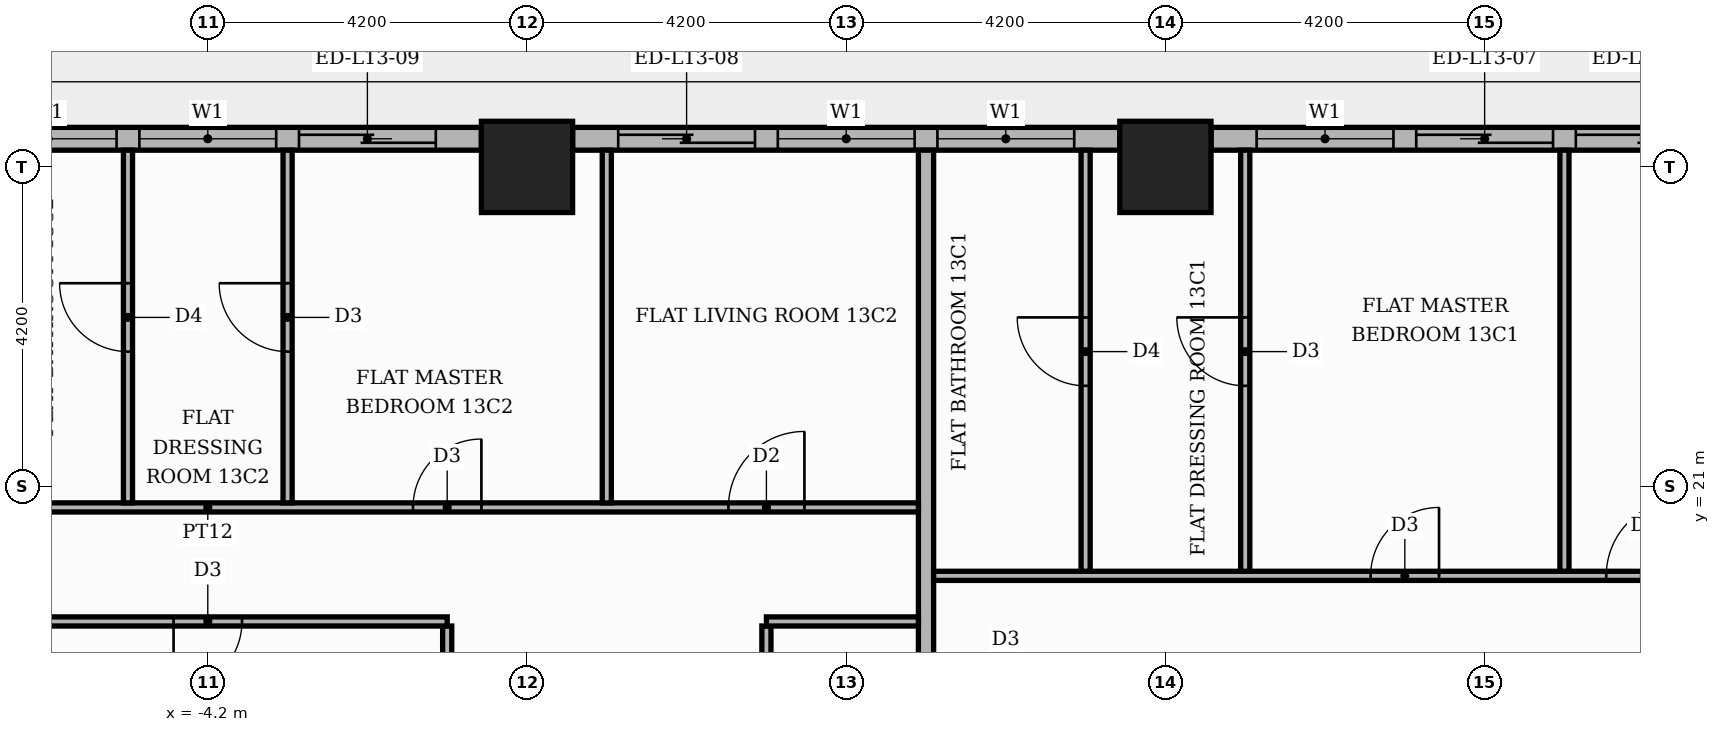
"""IFC4 building model, lengths in metres.
Left out: names, types, materials, properties, quantities, classifications, styles, units other than length and angle.
Written with IfcOpenShell. Run it as: python <this file> out.ifc"""

import sys

from ifc_helpers import new_model, si_unit, direction, frame, frame_2d, origin, origin_2d, place, context, subcontext, project, spatial, rectangle, extrude, element, fill, save


model = new_model("IFC4")
c1 = context("Model", 3, precision=1e-05, world=origin(), true_north=direction((0.0, 1.0)))
c2 = subcontext(c1, "Body", "Model", "MODEL_VIEW")
j1 = project(units=[si_unit("LENGTHUNIT", "METRE"), si_unit("PLANEANGLEUNIT", "RADIAN")], contexts=[c1])
p1 = place(None, origin())
s1 = spatial("IfcSite", under=j1, at=p1, CompositionType="ELEMENT")
p2 = place(p1, origin())
s2 = spatial("IfcBuilding", under=s1, at=p2, CompositionType="ELEMENT")
p3 = place(p2, frame((0.0, 0.0, 58.2)))
s3 = spatial("IfcBuildingStorey", under=s2, at=p3, CompositionType="ELEMENT", Elevation=58.2)
for number, where, z_axis, x_axis in (
    (1, (0.0, 25.2, 0.0), (0.0, 0.0, 1.0), (1.0, 0.0, 0.0)),
    (2, (8.4, 25.2, 0.0), (0.0, 0.0, 1.0), (1.0, 0.0, 0.0)),
):
    element("IfcColumn", number, at=place(p3, frame(where, z_axis=z_axis, x_axis=x_axis)), inside=s3, PredefinedType="COLUMN", context=c2, shape_type="SweptSolid", body=[
        extrude(rectangle(XDim=1.2, YDim=1.2, at=origin_2d()), origin(), (0.0, 0.0, 1.0), 3.9),
    ])
p4 = place(p3, frame((16.2, 25.57, 0.0), z_axis=(0.0, 0.0, 1.0), x_axis=(-1.0, 0.0, 0.0)))
e3 = element("IfcWall", 3, at=p4, inside=s3, PredefinedType="STANDARD", context=c2, shape_type="SweptSolid", body=[
    extrude(rectangle(XDim=7.2, YDim=0.3, at=frame_2d((3.6, 0.0))), origin(), (0.0, 0.0, 1.0), 3.48),
])
p5 = place(p4, frame((0.6, 0.0, 0.0)))
e4 = element("IfcOpeningElement", 4, at=p5, cuts=e3, PredefinedType="OPENING", context=c2, shape_type="SweptSolid", body=[
    extrude(rectangle(XDim=1.8, YDim=2.4, at=frame_2d((0.9, 1.2))), frame((0.0, 0.16, 0.0), z_axis=(0.0, -1.0, 0.0), x_axis=(1.0, 0.0, 0.0)), (0.0, 0.0, 1.0), 0.32),
])
p6 = place(p4, frame((2.7, 0.0, 0.0)))
e5 = element("IfcOpeningElement", 5, at=p6, cuts=e3, PredefinedType="OPENING", context=c2, shape_type="SweptSolid", body=[
    extrude(rectangle(XDim=1.8, YDim=2.4, at=frame_2d((0.9, 1.2))), frame((0.0, 0.16, 0.0), z_axis=(0.0, -1.0, 0.0), x_axis=(1.0, 0.0, 0.0)), (0.0, 0.0, 1.0), 0.32),
])
p7 = place(p4, frame((4.8, 0.0, 0.9)))
e6 = element("IfcOpeningElement", 6, at=p7, cuts=e3, PredefinedType="OPENING", context=c2, shape_type="SweptSolid", body=[
    extrude(rectangle(XDim=1.8, YDim=2.1, at=frame_2d((0.9, 1.05))), frame((0.0, 0.16, 0.0), z_axis=(0.0, -1.0, 0.0), x_axis=(1.0, 0.0, 0.0)), (0.0, 0.0, 1.0), 0.32),
])
p8 = place(p3, frame((7.8, 25.57, 0.0), z_axis=(0.0, 0.0, 1.0), x_axis=(-1.0, 0.0, 0.0)))
e7 = element("IfcWall", 7, at=p8, inside=s3, PredefinedType="STANDARD", context=c2, shape_type="SweptSolid", body=[
    extrude(rectangle(XDim=7.2, YDim=0.3, at=frame_2d((3.6, 0.0))), origin(), (0.0, 0.0, 1.0), 3.48),
])
p9 = place(p8, frame((0.6, 0.0, 0.9)))
e8 = element("IfcOpeningElement", 8, at=p9, cuts=e7, PredefinedType="OPENING", context=c2, shape_type="SweptSolid", body=[
    extrude(rectangle(XDim=1.8, YDim=2.1, at=frame_2d((0.9, 1.05))), frame((0.0, 0.16, 0.0), z_axis=(0.0, -1.0, 0.0), x_axis=(1.0, 0.0, 0.0)), (0.0, 0.0, 1.0), 0.32),
])
p10 = place(p8, frame((2.7, 0.0, 0.9)))
e9 = element("IfcOpeningElement", 9, at=p10, cuts=e7, PredefinedType="OPENING", context=c2, shape_type="SweptSolid", body=[
    extrude(rectangle(XDim=1.8, YDim=2.1, at=frame_2d((0.9, 1.05))), frame((0.0, 0.16, 0.0), z_axis=(0.0, -1.0, 0.0), x_axis=(1.0, 0.0, 0.0)), (0.0, 0.0, 1.0), 0.32),
])
p11 = place(p8, frame((4.8, 0.0, 0.0)))
e10 = element("IfcOpeningElement", 10, at=p11, cuts=e7, PredefinedType="OPENING", context=c2, shape_type="SweptSolid", body=[
    extrude(rectangle(XDim=1.8, YDim=2.4, at=frame_2d((0.9, 1.2))), frame((0.0, 0.16, 0.0), z_axis=(0.0, -1.0, 0.0), x_axis=(1.0, 0.0, 0.0)), (0.0, 0.0, 1.0), 0.32),
])
p12 = place(p3, frame((-0.6, 25.57, 0.0), z_axis=(0.0, 0.0, 1.0), x_axis=(-1.0, 0.0, 0.0)))
e11 = element("IfcWall", 11, at=p12, inside=s3, PredefinedType="STANDARD", context=c2, shape_type="SweptSolid", body=[
    extrude(rectangle(XDim=7.2, YDim=0.3, at=frame_2d((3.6, 0.0))), origin(), (0.0, 0.0, 1.0), 3.48),
])
p13 = place(p12, frame((0.6, 0.0, 0.0)))
e12 = element("IfcOpeningElement", 12, at=p13, cuts=e11, PredefinedType="OPENING", context=c2, shape_type="SweptSolid", body=[
    extrude(rectangle(XDim=1.8, YDim=2.4, at=frame_2d((0.9, 1.2))), frame((0.0, 0.16, 0.0), z_axis=(0.0, -1.0, 0.0), x_axis=(1.0, 0.0, 0.0)), (0.0, 0.0, 1.0), 0.32),
])
p14 = place(p12, frame((2.7, 0.0, 0.9)))
e13 = element("IfcOpeningElement", 13, at=p14, cuts=e11, PredefinedType="OPENING", context=c2, shape_type="SweptSolid", body=[
    extrude(rectangle(XDim=1.8, YDim=2.1, at=frame_2d((0.9, 1.05))), frame((0.0, 0.16, 0.0), z_axis=(0.0, -1.0, 0.0), x_axis=(1.0, 0.0, 0.0)), (0.0, 0.0, 1.0), 0.32),
])
p15 = place(p12, frame((4.8, 0.0, 0.9)))
e14 = element("IfcOpeningElement", 14, at=p15, cuts=e11, PredefinedType="OPENING", context=c2, shape_type="SweptSolid", body=[
    extrude(rectangle(XDim=1.8, YDim=2.1, at=frame_2d((0.9, 1.05))), frame((0.0, 0.16, 0.0), z_axis=(0.0, -1.0, 0.0), x_axis=(1.0, 0.0, 0.0)), (0.0, 0.0, 1.0), 0.32),
])
p16 = place(p3, frame((-1.05, 13.75, 0.0), z_axis=(0.0, 0.0, 1.0), x_axis=(0.0, 1.0, 0.0)))
e15 = element("IfcWall", 15, at=p16, inside=s3, PredefinedType="PARTITIONING", context=c2, shape_type="SweptSolid", body=[
    extrude(rectangle(XDim=5.41, YDim=0.12, at=frame_2d((2.705, 0.0))), origin(), (0.0, 0.0, 1.0), 3.48),
])
p17 = place(p3, frame((3.15, 13.75, 0.0), z_axis=(0.0, 0.0, 1.0), x_axis=(0.0, 1.0, 0.0)))
e16 = element("IfcWall", 16, at=p17, inside=s3, PredefinedType="PARTITIONING", context=c2, shape_type="SweptSolid", body=[
    extrude(rectangle(XDim=5.41, YDim=0.12, at=frame_2d((2.705, 0.0))), origin(), (0.0, 0.0, 1.0), 3.48),
])
p18 = place(p17, frame((2.235, 0.0, 0.0)))
e17 = element("IfcOpeningElement", 17, at=p18, cuts=e16, PredefinedType="OPENING", context=c2, shape_type="SweptSolid", body=[
    extrude(rectangle(XDim=0.9, YDim=2.1, at=frame_2d((0.45, 1.05))), frame((0.0, 0.07, 0.0), z_axis=(0.0, -1.0, 0.0), x_axis=(1.0, 0.0, 0.0)), (0.0, 0.0, 1.0), 0.14),
])
p19 = place(p3, frame((5.25, 13.75, 0.0), z_axis=(0.0, 0.0, 1.0), x_axis=(0.0, 1.0, 0.0)))
e18 = element("IfcWall", 18, at=p19, inside=s3, PredefinedType="PARTITIONING", context=c2, shape_type="SweptSolid", body=[
    extrude(rectangle(XDim=11.67, YDim=0.2, at=frame_2d((5.835, 0.0))), origin(), (0.0, 0.0, 1.0), 3.48),
])
p20 = place(p3, frame((-13.55, 19.22, 0.0), z_axis=(0.0, 0.0, 1.0), x_axis=(1.0, 0.0, 0.0)))
e19 = element("IfcWall", 19, at=p20, inside=s3, PredefinedType="PARTITIONING", context=c2, shape_type="SweptSolid", body=[
    extrude(rectangle(XDim=12.5, YDim=0.12, at=frame_2d((6.25, 0.0))), origin(), (0.0, 0.0, 1.0), 3.48),
])
p21 = place(p20, frame((8.9, 0.0, 0.0)))
e20 = element("IfcOpeningElement", 20, at=p21, cuts=e19, PredefinedType="OPENING", context=c2, shape_type="SweptSolid", body=[
    extrude(rectangle(XDim=0.9, YDim=2.1, at=frame_2d((0.45, 1.05))), frame((0.0, 0.07, 0.0), z_axis=(0.0, -1.0, 0.0), x_axis=(1.0, 0.0, 0.0)), (0.0, 0.0, 1.0), 0.14),
])
p22 = place(p20, frame((4.55, 0.0, 0.0)))
e21 = element("IfcOpeningElement", 21, at=p22, cuts=e19, PredefinedType="OPENING", context=c2, shape_type="SweptSolid", body=[
    extrude(rectangle(XDim=0.9, YDim=2.1, at=frame_2d((0.45, 1.05))), frame((0.0, 0.07, 0.0), z_axis=(0.0, -1.0, 0.0), x_axis=(1.0, 0.0, 0.0)), (0.0, 0.0, 1.0), 0.14),
])
p23 = place(p20, frame((1.4, 0.0, 0.0)))
e22 = element("IfcOpeningElement", 22, at=p23, cuts=e19, PredefinedType="OPENING", context=c2, shape_type="SweptSolid", body=[
    extrude(rectangle(XDim=0.9, YDim=2.1, at=frame_2d((0.45, 1.05))), frame((0.0, 0.07, 0.0), z_axis=(0.0, -1.0, 0.0), x_axis=(1.0, 0.0, 0.0)), (0.0, 0.0, 1.0), 0.14),
])
p24 = place(p3, frame((3.15, 19.22, 0.0), z_axis=(0.0, 0.0, 1.0), x_axis=(1.0, 0.0, 0.0)))
e23 = element("IfcWall", 23, at=p24, inside=s3, PredefinedType="PARTITIONING", context=c2, shape_type="SweptSolid", body=[
    extrude(rectangle(XDim=2.0, YDim=0.12, at=frame_2d((1.0, 0.0))), origin(), (0.0, 0.0, 1.0), 3.48),
])
p25 = place(p3, frame((5.35, 19.82, 0.0), z_axis=(0.0, 0.0, 1.0), x_axis=(1.0, 0.0, 0.0)))
e24 = element("IfcWall", 24, at=p25, inside=s3, PredefinedType="PARTITIONING", context=c2, shape_type="SweptSolid", body=[
    extrude(rectangle(XDim=11.95, YDim=0.12, at=frame_2d((5.975, 0.0))), origin(), (0.0, 0.0, 1.0), 3.48),
])
p26 = place(p25, frame((8.85, 0.0, 0.0)))
e25 = element("IfcOpeningElement", 25, at=p26, cuts=e24, PredefinedType="OPENING", context=c2, shape_type="SweptSolid", body=[
    extrude(rectangle(XDim=1.0, YDim=2.1, at=frame_2d((0.5, 1.05))), frame((0.0, 0.07, 0.0), z_axis=(0.0, -1.0, 0.0), x_axis=(1.0, 0.0, 0.0)), (0.0, 0.0, 1.0), 0.14),
])
p27 = place(p25, frame((5.75, 0.0, 0.0)))
e26 = element("IfcOpeningElement", 26, at=p27, cuts=e24, PredefinedType="OPENING", context=c2, shape_type="SweptSolid", body=[
    extrude(rectangle(XDim=0.9, YDim=2.1, at=frame_2d((0.45, 1.05))), frame((0.0, 0.07, 0.0), z_axis=(0.0, -1.0, 0.0), x_axis=(1.0, 0.0, 0.0)), (0.0, 0.0, 1.0), 0.14),
])
p28 = place(p3, frame((7.35, 19.88, 0.0), z_axis=(0.0, 0.0, 1.0), x_axis=(0.0, 1.0, 0.0)))
e27 = element("IfcWall", 27, at=p28, inside=s3, PredefinedType="PARTITIONING", context=c2, shape_type="SweptSolid", body=[
    extrude(rectangle(XDim=5.54, YDim=0.12, at=frame_2d((2.77, 0.0))), origin(), (0.0, 0.0, 1.0), 3.48),
])
p29 = place(p28, frame((2.44, 0.0, 0.0)))
e28 = element("IfcOpeningElement", 28, at=p29, cuts=e27, PredefinedType="OPENING", context=c2, shape_type="SweptSolid", body=[
    extrude(rectangle(XDim=0.9, YDim=2.1, at=frame_2d((0.45, 1.05))), frame((0.0, 0.07, 0.0), z_axis=(0.0, -1.0, 0.0), x_axis=(1.0, 0.0, 0.0)), (0.0, 0.0, 1.0), 0.14),
])
p30 = place(p3, frame((9.45, 19.88, 0.0), z_axis=(0.0, 0.0, 1.0), x_axis=(0.0, 1.0, 0.0)))
e29 = element("IfcWall", 29, at=p30, inside=s3, PredefinedType="PARTITIONING", context=c2, shape_type="SweptSolid", body=[
    extrude(rectangle(XDim=5.54, YDim=0.12, at=frame_2d((2.77, 0.0))), origin(), (0.0, 0.0, 1.0), 3.48),
])
p31 = place(p30, frame((2.44, 0.0, 0.0)))
e30 = element("IfcOpeningElement", 30, at=p31, cuts=e29, PredefinedType="OPENING", context=c2, shape_type="SweptSolid", body=[
    extrude(rectangle(XDim=0.9, YDim=2.1, at=frame_2d((0.45, 1.05))), frame((0.0, 0.07, 0.0), z_axis=(0.0, -1.0, 0.0), x_axis=(1.0, 0.0, 0.0)), (0.0, 0.0, 1.0), 0.14),
])
p32 = place(p3, frame((13.65, 19.88, 0.0), z_axis=(0.0, 0.0, 1.0), x_axis=(0.0, 1.0, 0.0)))
e31 = element("IfcWall", 31, at=p32, inside=s3, PredefinedType="PARTITIONING", context=c2, shape_type="SweptSolid", body=[
    extrude(rectangle(XDim=5.54, YDim=0.12, at=frame_2d((2.77, 0.0))), origin(), (0.0, 0.0, 1.0), 3.48),
])
p33 = place(p3, frame((-13.55, 20.72, 0.0), z_axis=(0.0, 0.0, 1.0), x_axis=(1.0, 0.0, 0.0)))
e32 = element("IfcWall", 32, at=p33, inside=s3, PredefinedType="PARTITIONING", context=c2, shape_type="SweptSolid", body=[
    extrude(rectangle(XDim=18.7, YDim=0.12, at=frame_2d((9.35, 0.0))), origin(), (0.0, 0.0, 1.0), 3.48),
])
p34 = place(p33, frame((16.2, 0.0, 0.0)))
e33 = element("IfcOpeningElement", 33, at=p34, cuts=e32, PredefinedType="OPENING", context=c2, shape_type="SweptSolid", body=[
    extrude(rectangle(XDim=1.0, YDim=2.1, at=frame_2d((0.5, 1.05))), frame((0.0, 0.07, 0.0), z_axis=(0.0, -1.0, 0.0), x_axis=(1.0, 0.0, 0.0)), (0.0, 0.0, 1.0), 0.14),
])
p35 = place(p33, frame((12.05, 0.0, 0.0)))
e34 = element("IfcOpeningElement", 34, at=p35, cuts=e32, PredefinedType="OPENING", context=c2, shape_type="SweptSolid", body=[
    extrude(rectangle(XDim=0.9, YDim=2.1, at=frame_2d((0.45, 1.05))), frame((0.0, 0.07, 0.0), z_axis=(0.0, -1.0, 0.0), x_axis=(1.0, 0.0, 0.0)), (0.0, 0.0, 1.0), 0.14),
])
p36 = place(p33, frame((3.65, 0.0, 0.0)))
e35 = element("IfcOpeningElement", 35, at=p36, cuts=e32, PredefinedType="OPENING", context=c2, shape_type="SweptSolid", body=[
    extrude(rectangle(XDim=0.9, YDim=2.1, at=frame_2d((0.45, 1.05))), frame((0.0, 0.07, 0.0), z_axis=(0.0, -1.0, 0.0), x_axis=(1.0, 0.0, 0.0)), (0.0, 0.0, 1.0), 0.14),
])
p37 = place(p3, frame((-5.25, 20.78, 0.0), z_axis=(0.0, 0.0, 1.0), x_axis=(0.0, 1.0, 0.0)))
e36 = element("IfcWall", 36, at=p37, inside=s3, PredefinedType="PARTITIONING", context=c2, shape_type="SweptSolid", body=[
    extrude(rectangle(XDim=4.64, YDim=0.12, at=frame_2d((2.32, 0.0))), origin(), (0.0, 0.0, 1.0), 3.48),
])
p38 = place(p37, frame((1.99, 0.0, 0.0)))
e37 = element("IfcOpeningElement", 37, at=p38, cuts=e36, PredefinedType="OPENING", context=c2, shape_type="SweptSolid", body=[
    extrude(rectangle(XDim=0.9, YDim=2.1, at=frame_2d((0.45, 1.05))), frame((0.0, 0.07, 0.0), z_axis=(0.0, -1.0, 0.0), x_axis=(1.0, 0.0, 0.0)), (0.0, 0.0, 1.0), 0.14),
])
p39 = place(p3, frame((-3.15, 20.78, 0.0), z_axis=(0.0, 0.0, 1.0), x_axis=(0.0, 1.0, 0.0)))
e38 = element("IfcWall", 38, at=p39, inside=s3, PredefinedType="PARTITIONING", context=c2, shape_type="SweptSolid", body=[
    extrude(rectangle(XDim=4.64, YDim=0.12, at=frame_2d((2.32, 0.0))), origin(), (0.0, 0.0, 1.0), 3.48),
])
p40 = place(p39, frame((1.99, 0.0, 0.0)))
e39 = element("IfcOpeningElement", 39, at=p40, cuts=e38, PredefinedType="OPENING", context=c2, shape_type="SweptSolid", body=[
    extrude(rectangle(XDim=0.9, YDim=2.1, at=frame_2d((0.45, 1.05))), frame((0.0, 0.07, 0.0), z_axis=(0.0, -1.0, 0.0), x_axis=(1.0, 0.0, 0.0)), (0.0, 0.0, 1.0), 0.14),
])
p41 = place(p3, frame((1.05, 20.78, 0.0), z_axis=(0.0, 0.0, 1.0), x_axis=(0.0, 1.0, 0.0)))
e40 = element("IfcWall", 40, at=p41, inside=s3, PredefinedType="PARTITIONING", context=c2, shape_type="SweptSolid", body=[
    extrude(rectangle(XDim=4.64, YDim=0.12, at=frame_2d((2.32, 0.0))), origin(), (0.0, 0.0, 1.0), 3.48),
])
p42 = place(p5, origin())
e41 = element("IfcDoor", 41, at=p42, inside=s3, OperationType="SLIDING_TO_LEFT", PredefinedType="DOOR", context=c2, shape_type="SweptSolid", body=[
    extrude(rectangle(XDim=1.8, YDim=2.4, at=frame_2d((0.9, 1.2))), frame((0.0, 0.025, 0.0), z_axis=(0.0, -1.0, 0.0), x_axis=(1.0, 0.0, 0.0)), (0.0, 0.0, 1.0), 0.05),
])
fill(e4, e41)
p43 = place(p6, origin())
e42 = element("IfcDoor", 42, at=p43, inside=s3, OperationType="SLIDING_TO_RIGHT", PredefinedType="DOOR", context=c2, shape_type="SweptSolid", body=[
    extrude(rectangle(XDim=1.8, YDim=2.4, at=frame_2d((0.9, 1.2))), frame((0.0, 0.025, 0.0), z_axis=(0.0, -1.0, 0.0), x_axis=(1.0, 0.0, 0.0)), (0.0, 0.0, 1.0), 0.05),
])
fill(e5, e42)
p44 = place(p7, origin())
e43 = element("IfcWindow", 43, at=p44, inside=s3, PartitioningType="SINGLE_PANEL", PredefinedType="WINDOW", context=c2, shape_type="SweptSolid", body=[
    extrude(rectangle(XDim=1.8, YDim=2.1, at=frame_2d((0.9, 1.05))), frame((0.0, 0.03, 0.0), z_axis=(0.0, -1.0, 0.0), x_axis=(1.0, 0.0, 0.0)), (0.0, 0.0, 1.0), 0.06),
])
fill(e6, e43)
p45 = place(p9, origin())
e44 = element("IfcWindow", 44, at=p45, inside=s3, PartitioningType="SINGLE_PANEL", PredefinedType="WINDOW", context=c2, shape_type="SweptSolid", body=[
    extrude(rectangle(XDim=1.8, YDim=2.1, at=frame_2d((0.9, 1.05))), frame((0.0, 0.03, 0.0), z_axis=(0.0, -1.0, 0.0), x_axis=(1.0, 0.0, 0.0)), (0.0, 0.0, 1.0), 0.06),
])
fill(e8, e44)
p46 = place(p10, origin())
e45 = element("IfcWindow", 45, at=p46, inside=s3, PartitioningType="SINGLE_PANEL", PredefinedType="WINDOW", context=c2, shape_type="SweptSolid", body=[
    extrude(rectangle(XDim=1.8, YDim=2.1, at=frame_2d((0.9, 1.05))), frame((0.0, 0.03, 0.0), z_axis=(0.0, -1.0, 0.0), x_axis=(1.0, 0.0, 0.0)), (0.0, 0.0, 1.0), 0.06),
])
fill(e9, e45)
p47 = place(p11, origin())
e46 = element("IfcDoor", 46, at=p47, inside=s3, OperationType="SLIDING_TO_RIGHT", PredefinedType="DOOR", context=c2, shape_type="SweptSolid", body=[
    extrude(rectangle(XDim=1.8, YDim=2.4, at=frame_2d((0.9, 1.2))), frame((0.0, 0.025, 0.0), z_axis=(0.0, -1.0, 0.0), x_axis=(1.0, 0.0, 0.0)), (0.0, 0.0, 1.0), 0.05),
])
fill(e10, e46)
p48 = place(p13, origin())
e47 = element("IfcDoor", 47, at=p48, inside=s3, OperationType="SLIDING_TO_LEFT", PredefinedType="DOOR", context=c2, shape_type="SweptSolid", body=[
    extrude(rectangle(XDim=1.8, YDim=2.4, at=frame_2d((0.9, 1.2))), frame((0.0, 0.025, 0.0), z_axis=(0.0, -1.0, 0.0), x_axis=(1.0, 0.0, 0.0)), (0.0, 0.0, 1.0), 0.05),
])
fill(e12, e47)
p49 = place(p14, origin())
e48 = element("IfcWindow", 48, at=p49, inside=s3, PartitioningType="SINGLE_PANEL", PredefinedType="WINDOW", context=c2, shape_type="SweptSolid", body=[
    extrude(rectangle(XDim=1.8, YDim=2.1, at=frame_2d((0.9, 1.05))), frame((0.0, 0.03, 0.0), z_axis=(0.0, -1.0, 0.0), x_axis=(1.0, 0.0, 0.0)), (0.0, 0.0, 1.0), 0.06),
])
fill(e13, e48)
p50 = place(p15, origin())
e49 = element("IfcWindow", 49, at=p50, inside=s3, PartitioningType="SINGLE_PANEL", PredefinedType="WINDOW", context=c2, shape_type="SweptSolid", body=[
    extrude(rectangle(XDim=1.8, YDim=2.1, at=frame_2d((0.9, 1.05))), frame((0.0, 0.03, 0.0), z_axis=(0.0, -1.0, 0.0), x_axis=(1.0, 0.0, 0.0)), (0.0, 0.0, 1.0), 0.06),
])
fill(e14, e49)
p51 = place(p26, origin())
e50 = element("IfcDoor", 50, at=p51, inside=s3, OperationType="SINGLE_SWING_RIGHT", PredefinedType="DOOR", context=c2, shape_type="SweptSolid", body=[
    extrude(rectangle(XDim=1.0, YDim=2.1, at=frame_2d((0.5, 1.05))), frame((0.0, 0.025, 0.0), z_axis=(0.0, -1.0, 0.0), x_axis=(1.0, 0.0, 0.0)), (0.0, 0.0, 1.0), 0.05),
])
fill(e25, e50)
p52 = place(p27, origin())
e51 = element("IfcDoor", 51, at=p52, inside=s3, OperationType="SINGLE_SWING_RIGHT", PredefinedType="DOOR", context=c2, shape_type="SweptSolid", body=[
    extrude(rectangle(XDim=0.9, YDim=2.1, at=frame_2d((0.45, 1.05))), frame((0.0, 0.025, 0.0), z_axis=(0.0, -1.0, 0.0), x_axis=(1.0, 0.0, 0.0)), (0.0, 0.0, 1.0), 0.05),
])
fill(e26, e51)
p53 = place(p31, origin())
e52 = element("IfcDoor", 52, at=p53, inside=s3, OperationType="SINGLE_SWING_RIGHT", PredefinedType="DOOR", context=c2, shape_type="SweptSolid", body=[
    extrude(rectangle(XDim=0.9, YDim=2.1, at=frame_2d((0.45, 1.05))), frame((0.0, 0.025, 0.0), z_axis=(0.0, -1.0, 0.0), x_axis=(1.0, 0.0, 0.0)), (0.0, 0.0, 1.0), 0.05),
])
fill(e30, e52)
p54 = place(p29, origin())
e53 = element("IfcDoor", 53, at=p54, inside=s3, OperationType="SINGLE_SWING_RIGHT", PredefinedType="DOOR", context=c2, shape_type="SweptSolid", body=[
    extrude(rectangle(XDim=0.9, YDim=2.1, at=frame_2d((0.45, 1.05))), frame((0.0, 0.025, 0.0), z_axis=(0.0, -1.0, 0.0), x_axis=(1.0, 0.0, 0.0)), (0.0, 0.0, 1.0), 0.05),
])
fill(e28, e53)
p55 = place(p21, frame((0.9, 0.0, 0.0), z_axis=(0.0, 0.0, 1.0), x_axis=(-1.0, 0.0, 0.0)))
e54 = element("IfcDoor", 54, at=p55, inside=s3, OperationType="SINGLE_SWING_LEFT", PredefinedType="DOOR", context=c2, shape_type="SweptSolid", body=[
    extrude(rectangle(XDim=0.9, YDim=2.1, at=frame_2d((0.45, 1.05))), frame((0.0, 0.025, 0.0), z_axis=(0.0, -1.0, 0.0), x_axis=(1.0, 0.0, 0.0)), (0.0, 0.0, 1.0), 0.05),
])
fill(e20, e54)
p56 = place(p34, origin())
e55 = element("IfcDoor", 55, at=p56, inside=s3, OperationType="SINGLE_SWING_RIGHT", PredefinedType="DOOR", context=c2, shape_type="SweptSolid", body=[
    extrude(rectangle(XDim=1.0, YDim=2.1, at=frame_2d((0.5, 1.05))), frame((0.0, 0.025, 0.0), z_axis=(0.0, -1.0, 0.0), x_axis=(1.0, 0.0, 0.0)), (0.0, 0.0, 1.0), 0.05),
])
fill(e33, e55)
p57 = place(p35, origin())
e56 = element("IfcDoor", 56, at=p57, inside=s3, OperationType="SINGLE_SWING_RIGHT", PredefinedType="DOOR", context=c2, shape_type="SweptSolid", body=[
    extrude(rectangle(XDim=0.9, YDim=2.1, at=frame_2d((0.45, 1.05))), frame((0.0, 0.025, 0.0), z_axis=(0.0, -1.0, 0.0), x_axis=(1.0, 0.0, 0.0)), (0.0, 0.0, 1.0), 0.05),
])
fill(e34, e56)
p58 = place(p40, origin())
e57 = element("IfcDoor", 57, at=p58, inside=s3, OperationType="SINGLE_SWING_RIGHT", PredefinedType="DOOR", context=c2, shape_type="SweptSolid", body=[
    extrude(rectangle(XDim=0.9, YDim=2.1, at=frame_2d((0.45, 1.05))), frame((0.0, 0.025, 0.0), z_axis=(0.0, -1.0, 0.0), x_axis=(1.0, 0.0, 0.0)), (0.0, 0.0, 1.0), 0.05),
])
fill(e39, e57)
p59 = place(p38, origin())
e58 = element("IfcDoor", 58, at=p59, inside=s3, OperationType="SINGLE_SWING_RIGHT", PredefinedType="DOOR", context=c2, shape_type="SweptSolid", body=[
    extrude(rectangle(XDim=0.9, YDim=2.1, at=frame_2d((0.45, 1.05))), frame((0.0, 0.025, 0.0), z_axis=(0.0, -1.0, 0.0), x_axis=(1.0, 0.0, 0.0)), (0.0, 0.0, 1.0), 0.05),
])
fill(e37, e58)
save(model, sys.argv[1])
